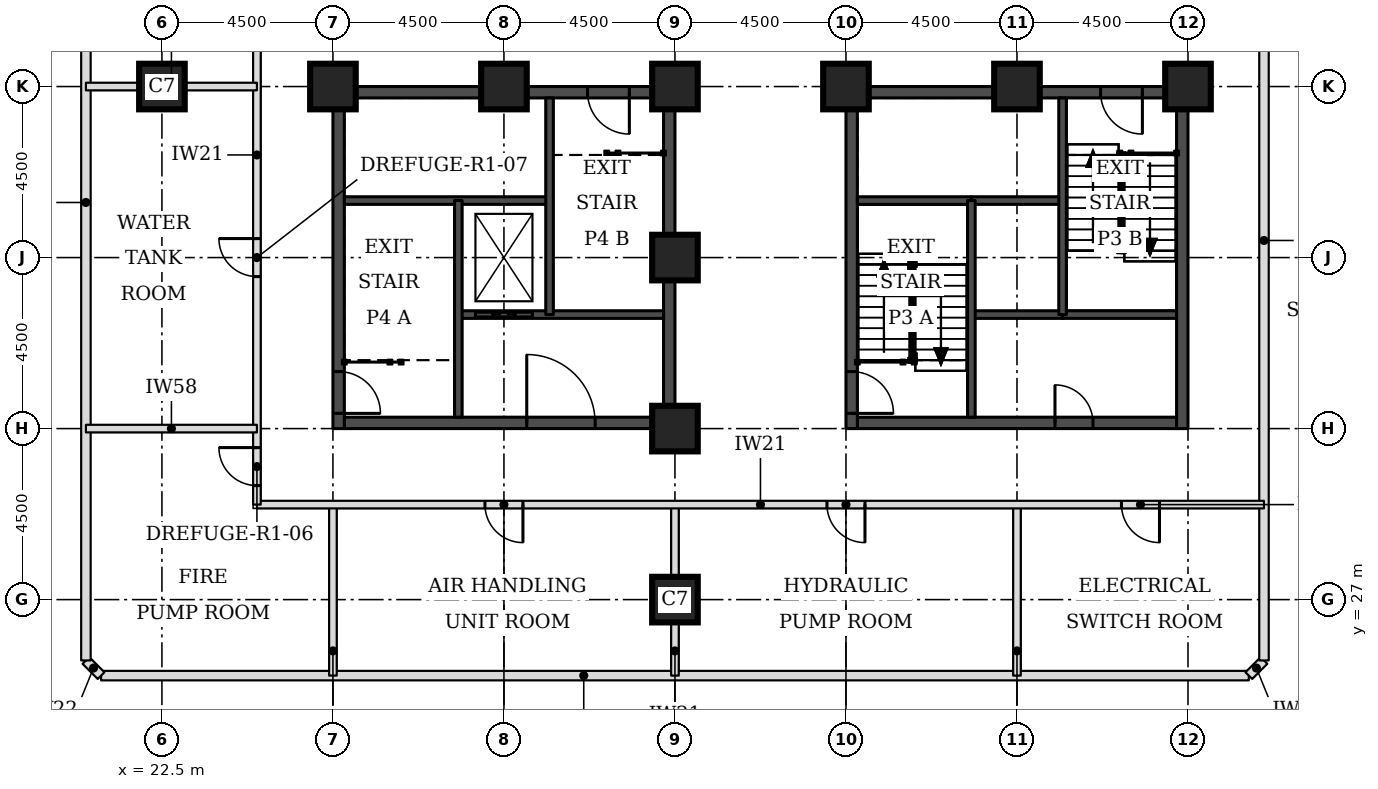
"""IFC4 building model, lengths in metres.
Left out: names, types, materials, properties, quantities, classifications, styles, units other than length and angle.
Written with IfcOpenShell. Run it as: python <this file> out.ifc"""

import sys

from ifc_helpers import new_model, si_unit, direction, frame, frame_2d, origin, origin_2d, place, context, subcontext, project, spatial, rectangle, extrude, element, fill, save


model = new_model("IFC4")
c1 = context("Model", 3, precision=1e-05, world=origin(), true_north=direction((0.0, 1.0)))
c2 = subcontext(c1, "Body", "Model", "MODEL_VIEW")
j1 = project(units=[si_unit("LENGTHUNIT", "METRE"), si_unit("PLANEANGLEUNIT", "RADIAN")], contexts=[c1])
p1 = place(None, origin())
s1 = spatial("IfcSite", under=j1, at=p1, CompositionType="ELEMENT")
p2 = place(p1, origin())
s2 = spatial("IfcBuilding", under=s1, at=p2, CompositionType="ELEMENT")
p3 = place(p2, frame((0.0, 0.0, 69.3)))
s3 = spatial("IfcBuildingStorey", under=s2, at=p3, CompositionType="ELEMENT", Elevation=69.3)
for number, where, z_axis, x_axis in (
    (1, (36.0, 27.0, 0.0), (0.0, 0.0, 1.0), (1.0, 0.0, 0.0)),
    (2, (36.0, 31.5, 0.0), (0.0, 0.0, 1.0), (1.0, 0.0, 0.0)),
    (3, (36.0, 36.0, 0.0), (0.0, 0.0, 1.0), (1.0, 0.0, 0.0)),
    (4, (22.5, 40.5, 0.0), (0.0, 0.0, 1.0), (1.0, 0.0, 0.0)),
    (5, (27.0, 40.5, 0.0), (0.0, 0.0, 1.0), (1.0, 0.0, 0.0)),
    (6, (31.5, 40.5, 0.0), (0.0, 0.0, 1.0), (1.0, 0.0, 0.0)),
    (7, (36.0, 40.5, 0.0), (0.0, 0.0, 1.0), (1.0, 0.0, 0.0)),
    (8, (40.5, 40.5, 0.0), (0.0, 0.0, 1.0), (1.0, 0.0, 0.0)),
    (9, (45.0, 40.5, 0.0), (0.0, 0.0, 1.0), (1.0, 0.0, 0.0)),
    (10, (49.5, 40.5, 0.0), (0.0, 0.0, 1.0), (1.0, 0.0, 0.0)),
):
    element("IfcColumn", number, at=place(p3, frame(where, z_axis=z_axis, x_axis=x_axis)), inside=s3, PredefinedType="COLUMN", context=c2, shape_type="SweptSolid", body=[
        extrude(rectangle(XDim=1.2, YDim=1.2, at=origin_2d()), origin(), (0.0, 0.0, 1.0), 5.0),
    ])
p4 = place(p3, frame((40.8, 31.65, 0.0), z_axis=(0.0, 0.0, 1.0), x_axis=(1.0, 0.0, 0.0)))
e11 = element("IfcWall", 11, at=p4, inside=s3, PredefinedType="SHEAR", context=c2, shape_type="SweptSolid", body=[
    extrude(rectangle(XDim=8.4, YDim=0.3, at=frame_2d((4.2, 0.0))), origin(), (0.0, 0.0, 1.0), 5.0),
])
p5 = place(p4, frame((5.2, 0.0, 0.0)))
e12 = element("IfcOpeningElement", 12, at=p5, cuts=e11, PredefinedType="OPENING", context=c2, shape_type="SweptSolid", body=[
    extrude(rectangle(XDim=1.0, YDim=2.1, at=frame_2d((0.5, 1.05))), frame((0.0, 0.16, 0.0), z_axis=(0.0, -1.0, 0.0), x_axis=(1.0, 0.0, 0.0)), (0.0, 0.0, 1.0), 0.32),
])
p6 = place(p3, frame((40.8, 40.35, 0.0), z_axis=(0.0, 0.0, 1.0), x_axis=(1.0, 0.0, 0.0)))
e13 = element("IfcWall", 13, at=p6, inside=s3, PredefinedType="SHEAR", context=c2, shape_type="SweptSolid", body=[
    extrude(rectangle(XDim=8.4, YDim=0.3, at=frame_2d((4.2, 0.0))), origin(), (0.0, 0.0, 1.0), 5.0),
])
p7 = place(p6, frame((6.4, 0.0, 0.0)))
e14 = element("IfcOpeningElement", 14, at=p7, cuts=e13, PredefinedType="OPENING", context=c2, shape_type="SweptSolid", body=[
    extrude(rectangle(XDim=1.1, YDim=2.1, at=frame_2d((0.55, 1.05))), frame((0.0, 0.16, 0.0), z_axis=(0.0, -1.0, 0.0), x_axis=(1.0, 0.0, 0.0)), (0.0, 0.0, 1.0), 0.32),
])
p8 = place(p3, frame((40.65, 31.5, 0.0), z_axis=(0.0, 0.0, 1.0), x_axis=(0.0, 1.0, 0.0)))
e15 = element("IfcWall", 15, at=p8, inside=s3, PredefinedType="SHEAR", context=c2, shape_type="SweptSolid", body=[
    extrude(rectangle(XDim=9.0, YDim=0.3, at=frame_2d((4.5, 0.0))), origin(), (0.0, 0.0, 1.0), 5.0),
])
p9 = place(p8, frame((0.4, 0.0, 0.0)))
e16 = element("IfcOpeningElement", 16, at=p9, cuts=e15, PredefinedType="OPENING", context=c2, shape_type="SweptSolid", body=[
    extrude(rectangle(XDim=1.1, YDim=2.1, at=frame_2d((0.55, 1.05))), frame((0.0, 0.16, 0.0), z_axis=(0.0, -1.0, 0.0), x_axis=(1.0, 0.0, 0.0)), (0.0, 0.0, 1.0), 0.32),
])
p10 = place(p3, frame((49.35, 31.5, 0.0), z_axis=(0.0, 0.0, 1.0), x_axis=(0.0, 1.0, 0.0)))
e17 = element("IfcWall", 17, at=p10, inside=s3, PredefinedType="SHEAR", context=c2, shape_type="SweptSolid", body=[
    extrude(rectangle(XDim=9.0, YDim=0.3, at=frame_2d((4.5, 0.0))), origin(), (0.0, 0.0, 1.0), 5.0),
])
p11 = place(p3, frame((27.3, 31.65, 0.0), z_axis=(0.0, 0.0, 1.0), x_axis=(1.0, 0.0, 0.0)))
e18 = element("IfcWall", 18, at=p11, inside=s3, PredefinedType="SHEAR", context=c2, shape_type="SweptSolid", body=[
    extrude(rectangle(XDim=8.4, YDim=0.3, at=frame_2d((4.2, 0.0))), origin(), (0.0, 0.0, 1.0), 5.0),
])
p12 = place(p11, frame((4.8, 0.0, 0.0)))
e19 = element("IfcOpeningElement", 19, at=p12, cuts=e18, PredefinedType="OPENING", context=c2, shape_type="SweptSolid", body=[
    extrude(rectangle(XDim=1.8, YDim=2.1, at=frame_2d((0.9, 1.05))), frame((0.0, 0.16, 0.0), z_axis=(0.0, -1.0, 0.0), x_axis=(1.0, 0.0, 0.0)), (0.0, 0.0, 1.0), 0.32),
])
p13 = place(p3, frame((27.3, 40.35, 0.0), z_axis=(0.0, 0.0, 1.0), x_axis=(1.0, 0.0, 0.0)))
e20 = element("IfcWall", 20, at=p13, inside=s3, PredefinedType="SHEAR", context=c2, shape_type="SweptSolid", body=[
    extrude(rectangle(XDim=8.4, YDim=0.3, at=frame_2d((4.2, 0.0))), origin(), (0.0, 0.0, 1.0), 5.0),
])
p14 = place(p13, frame((6.4, 0.0, 0.0)))
e21 = element("IfcOpeningElement", 21, at=p14, cuts=e20, PredefinedType="OPENING", context=c2, shape_type="SweptSolid", body=[
    extrude(rectangle(XDim=1.1, YDim=2.1, at=frame_2d((0.55, 1.05))), frame((0.0, 0.16, 0.0), z_axis=(0.0, -1.0, 0.0), x_axis=(1.0, 0.0, 0.0)), (0.0, 0.0, 1.0), 0.32),
])
p15 = place(p3, frame((27.15, 31.5, 0.0), z_axis=(0.0, 0.0, 1.0), x_axis=(0.0, 1.0, 0.0)))
e22 = element("IfcWall", 22, at=p15, inside=s3, PredefinedType="SHEAR", context=c2, shape_type="SweptSolid", body=[
    extrude(rectangle(XDim=9.0, YDim=0.3, at=frame_2d((4.5, 0.0))), origin(), (0.0, 0.0, 1.0), 5.0),
])
p16 = place(p15, frame((0.4, 0.0, 0.0)))
e23 = element("IfcOpeningElement", 23, at=p16, cuts=e22, PredefinedType="OPENING", context=c2, shape_type="SweptSolid", body=[
    extrude(rectangle(XDim=1.1, YDim=2.1, at=frame_2d((0.55, 1.05))), frame((0.0, 0.16, 0.0), z_axis=(0.0, -1.0, 0.0), x_axis=(1.0, 0.0, 0.0)), (0.0, 0.0, 1.0), 0.32),
])
p17 = place(p3, frame((35.85, 31.5, 0.0), z_axis=(0.0, 0.0, 1.0), x_axis=(0.0, 1.0, 0.0)))
e24 = element("IfcWall", 24, at=p17, inside=s3, PredefinedType="SHEAR", context=c2, shape_type="SweptSolid", body=[
    extrude(rectangle(XDim=9.0, YDim=0.3, at=frame_2d((4.5, 0.0))), origin(), (0.0, 0.0, 1.0), 5.0),
])
p18 = place(p3, frame((20.899, 25.0, 0.0), z_axis=(0.0, 0.0, 1.0), x_axis=(1.0, 0.0, 0.0)))
e25 = element("IfcWall", 25, at=p18, inside=s3, PredefinedType="PARTITIONING", context=c2, shape_type="SweptSolid", body=[
    extrude(rectangle(XDim=30.202, YDim=0.25, at=frame_2d((15.101, 0.0))), origin(), (0.0, 0.0, 1.0), 4.85),
])
for number, where, z_axis, x_axis in (
    (26, (51.101, 25.0, 0.0), (0.0, 0.0, 1.0), (0.707, 0.707, 0.0)),
    (27, (20.5, 25.399, 0.0), (0.0, 0.0, 1.0), (0.707, -0.707, 0.0)),
):
    element("IfcWall", number, at=place(p3, frame(where, z_axis=z_axis, x_axis=x_axis)), inside=s3, PredefinedType="PARTITIONING", context=c2, shape_type="SweptSolid", body=[
        extrude(rectangle(XDim=0.564, YDim=0.25, at=frame_2d((0.282, 0.0))), origin(), (0.0, 0.0, 1.0), 4.85),
    ])
p19 = place(p3, frame((20.5, 25.399, 0.0), z_axis=(0.0, 0.0, 1.0), x_axis=(0.0, 1.0, 0.0)))
e28 = element("IfcWall", 28, at=p19, inside=s3, PredefinedType="PARTITIONING", context=c2, shape_type="SweptSolid", body=[
    extrude(rectangle(XDim=24.101, YDim=0.25, at=frame_2d((12.051, 0.0))), origin(), (0.0, 0.0, 1.0), 4.85),
])
p20 = place(p3, frame((51.5, 25.399, 0.0), z_axis=(0.0, 0.0, 1.0), x_axis=(0.0, 1.0, 0.0)))
e29 = element("IfcWall", 29, at=p20, inside=s3, PredefinedType="PARTITIONING", context=c2, shape_type="SweptSolid", body=[
    extrude(rectangle(XDim=22.101, YDim=0.25, at=frame_2d((11.051, 0.0))), origin(), (0.0, 0.0, 1.0), 4.85),
])
for number, where, z_axis, x_axis in (
    (30, (27.0, 25.0, 0.0), (0.0, 0.0, 1.0), (0.0, 1.0, 0.0)),
    (31, (36.0, 25.0, 0.0), (0.0, 0.0, 1.0), (0.0, 1.0, 0.0)),
    (32, (45.0, 25.0, 0.0), (0.0, 0.0, 1.0), (0.0, 1.0, 0.0)),
):
    element("IfcWall", number, at=place(p3, frame(where, z_axis=z_axis, x_axis=x_axis)), inside=s3, PredefinedType="PARTITIONING", context=c2, shape_type="SweptSolid", body=[
        extrude(rectangle(XDim=4.5, YDim=0.2, at=frame_2d((2.25, 0.0))), origin(), (0.0, 0.0, 1.0), 4.85),
    ])
p21 = place(p3, frame((25.0, 29.5, 0.0), z_axis=(0.0, 0.0, 1.0), x_axis=(1.0, 0.0, 0.0)))
e33 = element("IfcWall", 33, at=p21, inside=s3, PredefinedType="PARTITIONING", context=c2, shape_type="SweptSolid", body=[
    extrude(rectangle(XDim=26.5, YDim=0.2, at=frame_2d((13.25, 0.0))), origin(), (0.0, 0.0, 1.0), 4.85),
])
p22 = place(p21, frame((6.0, 0.0, 0.0)))
e34 = element("IfcOpeningElement", 34, at=p22, cuts=e33, PredefinedType="OPENING", context=c2, shape_type="SweptSolid", body=[
    extrude(rectangle(XDim=1.0, YDim=2.1, at=frame_2d((0.5, 1.05))), frame((0.0, 0.11, 0.0), z_axis=(0.0, -1.0, 0.0), x_axis=(1.0, 0.0, 0.0)), (0.0, 0.0, 1.0), 0.22),
])
p23 = place(p21, frame((15.0, 0.0, 0.0)))
e35 = element("IfcOpeningElement", 35, at=p23, cuts=e33, PredefinedType="OPENING", context=c2, shape_type="SweptSolid", body=[
    extrude(rectangle(XDim=1.0, YDim=2.1, at=frame_2d((0.5, 1.05))), frame((0.0, 0.11, 0.0), z_axis=(0.0, -1.0, 0.0), x_axis=(1.0, 0.0, 0.0)), (0.0, 0.0, 1.0), 0.22),
])
p24 = place(p21, frame((22.75, 0.0, 0.0)))
e36 = element("IfcOpeningElement", 36, at=p24, cuts=e33, PredefinedType="OPENING", context=c2, shape_type="SweptSolid", body=[
    extrude(rectangle(XDim=1.0, YDim=2.1, at=frame_2d((0.5, 1.05))), frame((0.0, 0.11, 0.0), z_axis=(0.0, -1.0, 0.0), x_axis=(1.0, 0.0, 0.0)), (0.0, 0.0, 1.0), 0.22),
])
p25 = place(p3, frame((25.0, 29.5, 0.0), z_axis=(0.0, 0.0, 1.0), x_axis=(0.0, 1.0, 0.0)))
e37 = element("IfcWall", 37, at=p25, inside=s3, PredefinedType="PARTITIONING", context=c2, shape_type="SweptSolid", body=[
    extrude(rectangle(XDim=20.0, YDim=0.2, at=frame_2d((10.0, 0.0))), origin(), (0.0, 0.0, 1.0), 4.85),
])
p26 = place(p25, frame((0.5, 0.0, 0.0)))
e38 = element("IfcOpeningElement", 38, at=p26, cuts=e37, PredefinedType="OPENING", context=c2, shape_type="SweptSolid", body=[
    extrude(rectangle(XDim=1.0, YDim=2.1, at=frame_2d((0.5, 1.05))), frame((0.0, 0.11, 0.0), z_axis=(0.0, -1.0, 0.0), x_axis=(1.0, 0.0, 0.0)), (0.0, 0.0, 1.0), 0.22),
])
p27 = place(p25, frame((6.0, 0.0, 0.0)))
e39 = element("IfcOpeningElement", 39, at=p27, cuts=e37, PredefinedType="OPENING", context=c2, shape_type="SweptSolid", body=[
    extrude(rectangle(XDim=1.0, YDim=2.1, at=frame_2d((0.5, 1.05))), frame((0.0, 0.11, 0.0), z_axis=(0.0, -1.0, 0.0), x_axis=(1.0, 0.0, 0.0)), (0.0, 0.0, 1.0), 0.22),
])
p28 = place(p25, frame((15.0, 0.0, 0.0)))
e40 = element("IfcOpeningElement", 40, at=p28, cuts=e37, PredefinedType="OPENING", context=c2, shape_type="SweptSolid", body=[
    extrude(rectangle(XDim=1.0, YDim=2.1, at=frame_2d((0.5, 1.05))), frame((0.0, 0.11, 0.0), z_axis=(0.0, -1.0, 0.0), x_axis=(1.0, 0.0, 0.0)), (0.0, 0.0, 1.0), 0.22),
])
p29 = place(p3, frame((20.5, 31.5, 0.0), z_axis=(0.0, 0.0, 1.0), x_axis=(1.0, 0.0, 0.0)))
e41 = element("IfcWall", 41, at=p29, inside=s3, PredefinedType="PARTITIONING", context=c2, shape_type="SweptSolid", body=[
    extrude(rectangle(XDim=4.5, YDim=0.2, at=frame_2d((2.25, 0.0))), origin(), (0.0, 0.0, 1.0), 3.7),
])
p30 = place(p3, frame((20.5, 40.5, 0.0), z_axis=(0.0, 0.0, 1.0), x_axis=(1.0, 0.0, 0.0)))
e42 = element("IfcWall", 42, at=p30, inside=s3, PredefinedType="PARTITIONING", context=c2, shape_type="SweptSolid", body=[
    extrude(rectangle(XDim=4.5, YDim=0.2, at=frame_2d((2.25, 0.0))), origin(), (0.0, 0.0, 1.0), 4.85),
])
p31 = place(p3, frame((43.8, 34.5, 0.0), z_axis=(0.0, 0.0, 1.0), x_axis=(1.0, 0.0, 0.0)))
e43 = element("IfcWall", 43, at=p31, inside=s3, PredefinedType="SOLIDWALL", context=c2, shape_type="SweptSolid", body=[
    extrude(rectangle(XDim=2.4, YDim=0.2, at=frame_2d((1.2, 0.0))), origin(), (0.0, 0.0, 1.0), 4.85),
])
p32 = place(p3, frame((46.2, 34.5, 0.0), z_axis=(0.0, 0.0, 1.0), x_axis=(1.0, 0.0, 0.0)))
e44 = element("IfcWall", 44, at=p32, inside=s3, PredefinedType="SOLIDWALL", context=c2, shape_type="SweptSolid", body=[
    extrude(rectangle(XDim=3.0, YDim=0.2, at=frame_2d((1.5, 0.0))), origin(), (0.0, 0.0, 1.0), 4.85),
])
p33 = place(p3, frame((43.8, 37.5, 0.0), z_axis=(0.0, 0.0, 1.0), x_axis=(1.0, 0.0, 0.0)))
e45 = element("IfcWall", 45, at=p33, inside=s3, PredefinedType="SOLIDWALL", context=c2, shape_type="SweptSolid", body=[
    extrude(rectangle(XDim=2.4, YDim=0.2, at=frame_2d((1.2, 0.0))), origin(), (0.0, 0.0, 1.0), 5.0),
])
p34 = place(p3, frame((40.8, 37.5, 0.0), z_axis=(0.0, 0.0, 1.0), x_axis=(1.0, 0.0, 0.0)))
e46 = element("IfcWall", 46, at=p34, inside=s3, PredefinedType="SOLIDWALL", context=c2, shape_type="SweptSolid", body=[
    extrude(rectangle(XDim=3.0, YDim=0.2, at=frame_2d((1.5, 0.0))), origin(), (0.0, 0.0, 1.0), 4.85),
])
for number, where, z_axis, x_axis in (
    (47, (43.8, 31.8, 0.0), (0.0, 0.0, 1.0), (0.0, 1.0, 0.0)),
    (48, (46.2, 34.5, 0.0), (0.0, 0.0, 1.0), (0.0, 1.0, 0.0)),
):
    element("IfcWall", number, at=place(p3, frame(where, z_axis=z_axis, x_axis=x_axis)), inside=s3, PredefinedType="SOLIDWALL", context=c2, shape_type="SweptSolid", body=[
        extrude(rectangle(XDim=5.7, YDim=0.2, at=frame_2d((2.85, 0.0))), origin(), (0.0, 0.0, 1.0), 4.85),
    ])
p35 = place(p3, frame((30.3, 34.5, 0.0), z_axis=(0.0, 0.0, 1.0), x_axis=(1.0, 0.0, 0.0)))
e49 = element("IfcWall", 49, at=p35, inside=s3, PredefinedType="SOLIDWALL", context=c2, shape_type="SweptSolid", body=[
    extrude(rectangle(XDim=5.4, YDim=0.2, at=frame_2d((2.7, 0.0))), origin(), (0.0, 0.0, 1.0), 4.85),
])
p36 = place(p35, frame((0.45, 0.0, 0.0)))
e50 = element("IfcOpeningElement", 50, at=p36, cuts=e49, PredefinedType="OPENING", context=c2, shape_type="SweptSolid", body=[
    extrude(rectangle(XDim=1.5, YDim=2.1, at=frame_2d((0.75, 1.05))), frame((0.0, 0.11, 0.0), z_axis=(0.0, -1.0, 0.0), x_axis=(1.0, 0.0, 0.0)), (0.0, 0.0, 1.0), 0.22),
])
p37 = place(p3, frame((27.3, 37.5, 0.0), z_axis=(0.0, 0.0, 1.0), x_axis=(1.0, 0.0, 0.0)))
e51 = element("IfcWall", 51, at=p37, inside=s3, PredefinedType="SOLIDWALL", context=c2, shape_type="SweptSolid", body=[
    extrude(rectangle(XDim=5.4, YDim=0.2, at=frame_2d((2.7, 0.0))), origin(), (0.0, 0.0, 1.0), 4.85),
])
for number, where, z_axis, x_axis in (
    (52, (30.3, 31.8, 0.0), (0.0, 0.0, 1.0), (0.0, 1.0, 0.0)),
    (53, (32.7, 34.5, 0.0), (0.0, 0.0, 1.0), (0.0, 1.0, 0.0)),
):
    element("IfcWall", number, at=place(p3, frame(where, z_axis=z_axis, x_axis=x_axis)), inside=s3, PredefinedType="SOLIDWALL", context=c2, shape_type="SweptSolid", body=[
        extrude(rectangle(XDim=5.7, YDim=0.2, at=frame_2d((2.85, 0.0))), origin(), (0.0, 0.0, 1.0), 4.85),
    ])
p38 = place(p22, frame((1.0, 0.0, 0.0), z_axis=(0.0, 0.0, 1.0), x_axis=(-1.0, 0.0, 0.0)))
e54 = element("IfcDoor", 54, at=p38, inside=s3, OperationType="SINGLE_SWING_LEFT", PredefinedType="DOOR", context=c2, shape_type="SweptSolid", body=[
    extrude(rectangle(XDim=1.0, YDim=2.1, at=frame_2d((0.5, 1.05))), frame((0.0, 0.025, 0.0), z_axis=(0.0, -1.0, 0.0), x_axis=(1.0, 0.0, 0.0)), (0.0, 0.0, 1.0), 0.05),
])
fill(e34, e54)
p39 = place(p23, frame((1.0, 0.0, 0.0), z_axis=(0.0, 0.0, 1.0), x_axis=(-1.0, 0.0, 0.0)))
e55 = element("IfcDoor", 55, at=p39, inside=s3, OperationType="SINGLE_SWING_LEFT", PredefinedType="DOOR", context=c2, shape_type="SweptSolid", body=[
    extrude(rectangle(XDim=1.0, YDim=2.1, at=frame_2d((0.5, 1.05))), frame((0.0, 0.025, 0.0), z_axis=(0.0, -1.0, 0.0), x_axis=(1.0, 0.0, 0.0)), (0.0, 0.0, 1.0), 0.05),
])
fill(e35, e55)
p40 = place(p24, frame((1.0, 0.0, 0.0), z_axis=(0.0, 0.0, 1.0), x_axis=(-1.0, 0.0, 0.0)))
e56 = element("IfcDoor", 56, at=p40, inside=s3, OperationType="SINGLE_SWING_LEFT", PredefinedType="DOOR", context=c2, shape_type="SweptSolid", body=[
    extrude(rectangle(XDim=1.0, YDim=2.1, at=frame_2d((0.5, 1.05))), frame((0.0, 0.025, 0.0), z_axis=(0.0, -1.0, 0.0), x_axis=(1.0, 0.0, 0.0)), (0.0, 0.0, 1.0), 0.05),
])
fill(e36, e56)
p41 = place(p26, origin())
e57 = element("IfcDoor", 57, at=p41, inside=s3, OperationType="SINGLE_SWING_RIGHT", PredefinedType="DOOR", context=c2, shape_type="SweptSolid", body=[
    extrude(rectangle(XDim=1.0, YDim=2.1, at=frame_2d((0.5, 1.05))), frame((0.0, 0.025, 0.0), z_axis=(0.0, -1.0, 0.0), x_axis=(1.0, 0.0, 0.0)), (0.0, 0.0, 1.0), 0.05),
])
fill(e38, e57)
p42 = place(p27, origin())
e58 = element("IfcDoor", 58, at=p42, inside=s3, OperationType="SINGLE_SWING_RIGHT", PredefinedType="DOOR", context=c2, shape_type="SweptSolid", body=[
    extrude(rectangle(XDim=1.0, YDim=2.1, at=frame_2d((0.5, 1.05))), frame((0.0, 0.025, 0.0), z_axis=(0.0, -1.0, 0.0), x_axis=(1.0, 0.0, 0.0)), (0.0, 0.0, 1.0), 0.05),
])
fill(e39, e58)
p43 = place(p9, frame((1.1, 0.0, 0.0), z_axis=(0.0, 0.0, 1.0), x_axis=(-1.0, 0.0, 0.0)))
e59 = element("IfcDoor", 59, at=p43, inside=s3, OperationType="SINGLE_SWING_RIGHT", PredefinedType="DOOR", context=c2, shape_type="SweptSolid", body=[
    extrude(rectangle(XDim=1.1, YDim=2.1, at=frame_2d((0.55, 1.05))), frame((0.0, 0.025, 0.0), z_axis=(0.0, -1.0, 0.0), x_axis=(1.0, 0.0, 0.0)), (0.0, 0.0, 1.0), 0.05),
])
fill(e16, e59)
p44 = place(p7, frame((1.1, 0.0, 0.0), z_axis=(0.0, 0.0, 1.0), x_axis=(-1.0, 0.0, 0.0)))
e60 = element("IfcDoor", 60, at=p44, inside=s3, OperationType="SINGLE_SWING_LEFT", PredefinedType="DOOR", context=c2, shape_type="SweptSolid", body=[
    extrude(rectangle(XDim=1.1, YDim=2.1, at=frame_2d((0.55, 1.05))), frame((0.0, 0.025, 0.0), z_axis=(0.0, -1.0, 0.0), x_axis=(1.0, 0.0, 0.0)), (0.0, 0.0, 1.0), 0.05),
])
fill(e14, e60)
p45 = place(p5, origin())
e61 = element("IfcDoor", 61, at=p45, inside=s3, OperationType="SINGLE_SWING_LEFT", PredefinedType="DOOR", context=c2, shape_type="SweptSolid", body=[
    extrude(rectangle(XDim=1.0, YDim=2.1, at=frame_2d((0.5, 1.05))), frame((0.0, 0.025, 0.0), z_axis=(0.0, -1.0, 0.0), x_axis=(1.0, 0.0, 0.0)), (0.0, 0.0, 1.0), 0.05),
])
fill(e12, e61)
p46 = place(p16, frame((1.1, 0.0, 0.0), z_axis=(0.0, 0.0, 1.0), x_axis=(-1.0, 0.0, 0.0)))
e62 = element("IfcDoor", 62, at=p46, inside=s3, OperationType="SINGLE_SWING_RIGHT", PredefinedType="DOOR", context=c2, shape_type="SweptSolid", body=[
    extrude(rectangle(XDim=1.1, YDim=2.1, at=frame_2d((0.55, 1.05))), frame((0.0, 0.025, 0.0), z_axis=(0.0, -1.0, 0.0), x_axis=(1.0, 0.0, 0.0)), (0.0, 0.0, 1.0), 0.05),
])
fill(e23, e62)
p47 = place(p14, frame((1.1, 0.0, 0.0), z_axis=(0.0, 0.0, 1.0), x_axis=(-1.0, 0.0, 0.0)))
e63 = element("IfcDoor", 63, at=p47, inside=s3, OperationType="SINGLE_SWING_LEFT", PredefinedType="DOOR", context=c2, shape_type="SweptSolid", body=[
    extrude(rectangle(XDim=1.1, YDim=2.1, at=frame_2d((0.55, 1.05))), frame((0.0, 0.025, 0.0), z_axis=(0.0, -1.0, 0.0), x_axis=(1.0, 0.0, 0.0)), (0.0, 0.0, 1.0), 0.05),
])
fill(e21, e63)
p48 = place(p36, origin())
e64 = element("IfcDoor", 64, at=p48, inside=s3, OperationType="DOUBLE_DOOR_SLIDING", PredefinedType="DOOR", context=c2, shape_type="SweptSolid", body=[
    extrude(rectangle(XDim=1.5, YDim=2.1, at=frame_2d((0.75, 1.05))), frame((0.0, 0.025, 0.0), z_axis=(0.0, -1.0, 0.0), x_axis=(1.0, 0.0, 0.0)), (0.0, 0.0, 1.0), 0.05),
])
fill(e50, e64)
p49 = place(p12, origin())
e65 = element("IfcDoor", 65, at=p49, inside=s3, OperationType="SINGLE_SWING_LEFT", PredefinedType="DOOR", context=c2, shape_type="SweptSolid", body=[
    extrude(rectangle(XDim=1.8, YDim=2.1, at=frame_2d((0.9, 1.05))), frame((0.0, 0.025, 0.0), z_axis=(0.0, -1.0, 0.0), x_axis=(1.0, 0.0, 0.0)), (0.0, 0.0, 1.0), 0.05),
])
fill(e19, e65)
save(model, sys.argv[1])
